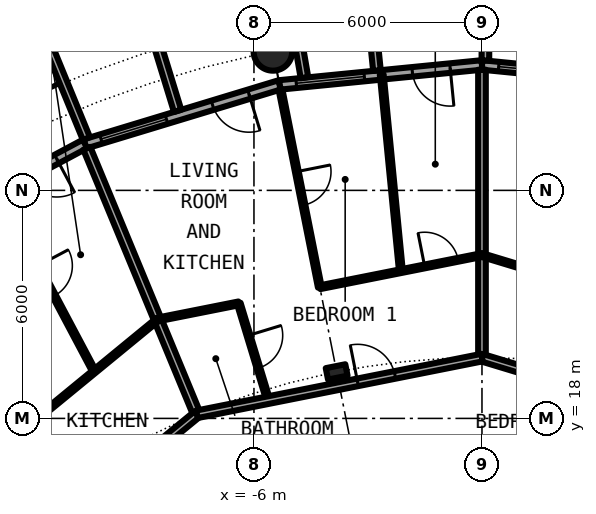
"""IFC4 building model, lengths in metres.
Left out: names, types, materials, properties, quantities, classifications, styles, units other than length and angle.
Written with IfcOpenShell. Run it as: python <this file> out.ifc"""

import sys

from ifc_helpers import new_model, si_unit, direction, frame, frame_2d, origin, origin_2d, place, context, subcontext, project, spatial, rectangle, hollow_circle, i_section, extrude, element, fill, save


model = new_model("IFC4")
c1 = context("Model", 3, precision=1e-05, world=origin(), true_north=direction((0.0, 1.0)))
c2 = subcontext(c1, "Body", "Model", "MODEL_VIEW")
j1 = project(units=[si_unit("LENGTHUNIT", "METRE"), si_unit("PLANEANGLEUNIT", "RADIAN")], contexts=[c1])
p1 = place(None, origin())
s1 = spatial("IfcSite", under=j1, at=p1, CompositionType="ELEMENT")
p2 = place(p1, origin())
s2 = spatial("IfcBuilding", under=s1, at=p2, CompositionType="ELEMENT")
p3 = place(p2, frame((0.0, 0.0, 88.0)))
s3 = spatial("IfcBuildingStorey", under=s2, at=p3, CompositionType="ELEMENT", Elevation=88.0)
p4 = place(p3, frame((-5.501, 27.658, 0.0), z_axis=(0.0, 0.0, 1.0), x_axis=(1.0, 0.0, 0.0)))
e1 = element("IfcColumn", 1, at=p4, inside=s3, PredefinedType="COLUMN", context=c2, shape_type="SweptSolid", body=[
    extrude(hollow_circle(Radius=0.508, WallThickness=0.04, at=origin_2d()), origin(), (0.0, 0.0, 1.0), 3.05),
])
p5 = place(p3, frame((-3.824, 19.223, 0.0), z_axis=(0.0, 0.0, 1.0), x_axis=(-0.195090322016, 0.980785280403, 0.0)))
e2 = element("IfcColumn", 2, at=p5, inside=s3, PredefinedType="COLUMN", context=c2, shape_type="SweptSolid", body=[
    extrude(i_section(OverallWidth=0.306, OverallDepth=0.524, WebThickness=0.021, FlangeThickness=0.04, FilletRadius=0.027, at=origin_2d()), origin(), (0.0, 0.0, 1.0), 3.05),
])
p6 = place(p3, frame((5.326, 26.775, 0.0), z_axis=(0.0, 0.0, 1.0), x_axis=(-0.995173996315, 0.098126026407, 0.0)))
e3 = element("IfcWall", 3, at=p6, inside=s3, PredefinedType="SOLIDWALL", context=c2, shape_type="SweptSolid", body=[
    extrude(rectangle(XDim=5.352, YDim=0.25, at=frame_2d((2.676, 0.0))), origin(), (0.0, 0.0, 1.0), 2.7),
])
p7 = place(p6, frame((0.841, 0.0, 0.0)))
e4 = element("IfcOpeningElement", 4, at=p7, cuts=e3, PredefinedType="OPENING", context=c2, shape_type="SweptSolid", body=[
    extrude(rectangle(XDim=1.0, YDim=2.2, at=frame_2d((0.5, 1.1))), frame((0.0, 0.135, 0.0), z_axis=(0.0, -1.0, 0.0), x_axis=(1.0, 0.0, 0.0)), (0.0, 0.0, 1.0), 0.27),
])
p8 = place(p6, frame((3.111, 0.0, 0.3)))
e5 = element("IfcOpeningElement", 5, at=p8, cuts=e3, PredefinedType="OPENING", context=c2, shape_type="SweptSolid", body=[
    extrude(rectangle(XDim=1.8, YDim=2.1, at=frame_2d((0.9, 1.05))), frame((0.0, 0.135, 0.0), z_axis=(0.0, -1.0, 0.0), x_axis=(1.0, 0.0, 0.0)), (0.0, 0.0, 1.0), 0.27),
])
p9 = place(p3, frame((0.09, 27.417, -0.03), z_axis=(0.0, 0.0, 1.0), x_axis=(0.00347308367, 0.999993968827, 0.0)))
e6 = element("IfcWall", 6, at=p9, inside=s3, PredefinedType="SOLIDWALL", context=c2, shape_type="SweptSolid", body=[
    extrude(rectangle(XDim=2.882, YDim=0.2, at=frame_2d((1.441, 0.0))), origin(), (0.0, 0.0, 1.0), 2.73),
])
p10 = place(p3, frame((0.0, 27.3, 0.0), z_axis=(0.0, 0.0, 1.0), x_axis=(-0.995173996315, -0.098126026407, 0.0)))
e7 = element("IfcWall", 7, at=p10, inside=s3, PredefinedType="SOLIDWALL", context=c2, shape_type="SweptSolid", body=[
    extrude(rectangle(XDim=5.352, YDim=0.25, at=frame_2d((2.676, 0.0))), origin(), (0.0, 0.0, 1.0), 2.7),
])
p11 = place(p10, frame((0.841, 0.0, 0.0)))
e8 = element("IfcOpeningElement", 8, at=p11, cuts=e7, PredefinedType="OPENING", context=c2, shape_type="SweptSolid", body=[
    extrude(rectangle(XDim=1.0, YDim=2.2, at=frame_2d((0.5, 1.1))), frame((0.0, 0.135, 0.0), z_axis=(0.0, -1.0, 0.0), x_axis=(1.0, 0.0, 0.0)), (0.0, 0.0, 1.0), 0.27),
])
p12 = place(p10, frame((3.111, 0.0, 0.3)))
e9 = element("IfcOpeningElement", 9, at=p12, cuts=e7, PredefinedType="OPENING", context=c2, shape_type="SweptSolid", body=[
    extrude(rectangle(XDim=1.8, YDim=2.1, at=frame_2d((0.9, 1.05))), frame((0.0, 0.135, 0.0), z_axis=(0.0, -1.0, 0.0), x_axis=(1.0, 0.0, 0.0)), (0.0, 0.0, 1.0), 0.27),
])
p13 = place(p3, frame((-2.764, 27.153, -0.03), z_axis=(0.0, 0.0, 1.0), x_axis=(-0.101505487237, 0.994834979311, 0.0)))
e10 = element("IfcWall", 10, at=p13, inside=s3, PredefinedType="SOLIDWALL", context=c2, shape_type="SweptSolid", body=[
    extrude(rectangle(XDim=3.007, YDim=0.2, at=frame_2d((1.503, 0.0))), origin(), (0.0, 0.0, 1.0), 2.73),
])
p14 = place(p3, frame((-4.671, 26.966, -0.03), z_axis=(0.0, 0.0, 1.0), x_axis=(-0.170539878907, 0.985350774954, 0.0)))
e11 = element("IfcWall", 11, at=p14, inside=s3, PredefinedType="SOLIDWALL", context=c2, shape_type="SweptSolid", body=[
    extrude(rectangle(XDim=2.932, YDim=0.2, at=frame_2d((1.466, 0.0))), origin(), (0.0, 0.0, 1.0), 2.73),
])
p15 = place(p3, frame((-5.326, 26.775, 0.0), z_axis=(0.0, 0.0, 1.0), x_axis=(-0.956965678721, -0.290201119486, 0.0)))
e12 = element("IfcWall", 12, at=p15, inside=s3, PredefinedType="SOLIDWALL", context=c2, shape_type="SweptSolid", body=[
    extrude(rectangle(XDim=5.351, YDim=0.25, at=frame_2d((2.676, 0.0))), origin(), (0.0, 0.0, 1.0), 2.7),
])
p16 = place(p15, frame((0.841, 0.0, 0.0)))
e13 = element("IfcOpeningElement", 13, at=p16, cuts=e12, PredefinedType="OPENING", context=c2, shape_type="SweptSolid", body=[
    extrude(rectangle(XDim=1.0, YDim=2.2, at=frame_2d((0.5, 1.1))), frame((0.0, 0.135, 0.0), z_axis=(0.0, -1.0, 0.0), x_axis=(1.0, 0.0, 0.0)), (0.0, 0.0, 1.0), 0.27),
])
p17 = place(p15, frame((3.111, 0.0, 0.3)))
e14 = element("IfcOpeningElement", 14, at=p17, cuts=e12, PredefinedType="OPENING", context=c2, shape_type="SweptSolid", body=[
    extrude(rectangle(XDim=1.8, YDim=2.1, at=frame_2d((0.9, 1.05))), frame((0.0, 0.135, 0.0), z_axis=(0.0, -1.0, 0.0), x_axis=(1.0, 0.0, 0.0)), (0.0, 0.0, 1.0), 0.27),
])
p18 = place(p3, frame((-8.009, 26.092, -0.03), z_axis=(0.0, 0.0, 1.0), x_axis=(-0.293406695073, 0.955987715029, 0.0)))
e15 = element("IfcWall", 15, at=p18, inside=s3, PredefinedType="SOLIDWALL", context=c2, shape_type="SweptSolid", body=[
    extrude(rectangle(XDim=3.006, YDim=0.2, at=frame_2d((1.503, 0.0))), origin(), (0.0, 0.0, 1.0), 2.73),
])
p19 = place(p3, frame((-10.409, 25.364, -0.03), z_axis=(0.0, 0.0, 1.0), x_axis=(-0.379509886562, 0.925187681501, 0.0)))
e16 = element("IfcWall", 16, at=p19, inside=s3, PredefinedType="SOLIDWALL", context=c2, shape_type="SweptSolid", body=[
    extrude(rectangle(XDim=2.883, YDim=0.2, at=frame_2d((1.441, 0.0))), origin(), (0.0, 0.0, 1.0), 2.73),
])
p20 = place(p3, frame((-10.447, 25.222, 0.0), z_axis=(0.0, 0.0, 1.0), x_axis=(-0.881915646801, -0.471407246368, 0.0)))
e17 = element("IfcWall", 17, at=p20, inside=s3, PredefinedType="SOLIDWALL", context=c2, shape_type="SweptSolid", body=[
    extrude(rectangle(XDim=5.352, YDim=0.25, at=frame_2d((2.676, 0.0))), origin(), (0.0, 0.0, 1.0), 2.7),
])
p21 = place(p20, frame((0.841, 0.0, 0.0)))
e18 = element("IfcOpeningElement", 18, at=p21, cuts=e17, PredefinedType="OPENING", context=c2, shape_type="SweptSolid", body=[
    extrude(rectangle(XDim=1.0, YDim=2.2, at=frame_2d((0.5, 1.1))), frame((0.0, 0.135, 0.0), z_axis=(0.0, -1.0, 0.0), x_axis=(1.0, 0.0, 0.0)), (0.0, 0.0, 1.0), 0.27),
])
p22 = place(p20, frame((3.111, 0.0, 0.3)))
e19 = element("IfcOpeningElement", 19, at=p22, cuts=e17, PredefinedType="OPENING", context=c2, shape_type="SweptSolid", body=[
    extrude(rectangle(XDim=1.8, YDim=2.1, at=frame_2d((0.9, 1.05))), frame((0.0, 0.135, 0.0), z_axis=(0.0, -1.0, 0.0), x_axis=(1.0, 0.0, 0.0)), (0.0, 0.0, 1.0), 0.27),
])
p23 = place(p3, frame((-12.734, 24.007, 0.0), z_axis=(0.0, 0.0, 1.0), x_axis=(0.468610030042, -0.883405139075, 0.0)))
e20 = element("IfcWall", 20, at=p23, inside=s3, PredefinedType="PARTITIONING", context=c2, shape_type="SweptSolid", body=[
    extrude(rectangle(XDim=5.403, YDim=0.1, at=frame_2d((2.702, 0.0))), origin(), (0.0, 0.0, 1.0), 2.7),
])
p24 = place(p23, frame((2.252, 0.0, 0.0)))
e21 = element("IfcOpeningElement", 21, at=p24, cuts=e20, PredefinedType="OPENING", context=c2, shape_type="SweptSolid", body=[
    extrude(rectangle(XDim=0.9, YDim=2.3, at=frame_2d((0.45, 1.15))), frame((0.0, 0.06, 0.0), z_axis=(0.0, -1.0, 0.0), x_axis=(1.0, 0.0, 0.0)), (0.0, 0.0, 1.0), 0.12),
])
p25 = place(p3, frame((-10.398, 25.106, 0.0), z_axis=(0.0, 0.0, 1.0), x_axis=(0.382490346157, -0.923959487801, 0.0)))
e22 = element("IfcWall", 22, at=p25, inside=s3, PredefinedType="PARTITIONING", context=c2, shape_type="SweptSolid", body=[
    extrude(rectangle(XDim=7.574, YDim=0.2, at=frame_2d((3.787, 0.0))), origin(), (0.0, 0.0, 1.0), 2.7),
])
p26 = place(p3, frame((-6.4, 21.027, 0.0), z_axis=(0.0, 0.0, 1.0), x_axis=(0.291157965538, -0.956674991365, 0.0)))
e23 = element("IfcWall", 23, at=p26, inside=s3, PredefinedType="PARTITIONING", context=c2, shape_type="SweptSolid", body=[
    extrude(rectangle(XDim=2.661, YDim=0.1, at=frame_2d((1.331, 0.0))), origin(), (0.0, 0.0, 1.0), 2.7),
])
p27 = place(p26, frame((0.881, 0.0, 0.0)))
e24 = element("IfcOpeningElement", 24, at=p27, cuts=e23, PredefinedType="OPENING", context=c2, shape_type="SweptSolid", body=[
    extrude(rectangle(XDim=0.9, YDim=2.3, at=frame_2d((0.45, 1.15))), frame((0.0, 0.06, 0.0), z_axis=(0.0, -1.0, 0.0), x_axis=(1.0, 0.0, 0.0)), (0.0, 0.0, 1.0), 0.12),
])
p28 = place(p3, frame((-5.302, 26.653, 0.0), z_axis=(0.0, 0.0, 1.0), x_axis=(0.195115793364, -0.980780213493, 0.0)))
e25 = element("IfcWall", 25, at=p28, inside=s3, PredefinedType="PARTITIONING", context=c2, shape_type="SweptSolid", body=[
    extrude(rectangle(XDim=5.304, YDim=0.1, at=frame_2d((2.652, 0.0))), origin(), (0.0, 0.0, 1.0), 2.7),
])
p29 = place(p28, frame((2.202, 0.0, 0.0)))
e26 = element("IfcOpeningElement", 26, at=p29, cuts=e25, PredefinedType="OPENING", context=c2, shape_type="SweptSolid", body=[
    extrude(rectangle(XDim=0.9, YDim=2.3, at=frame_2d((0.45, 1.15))), frame((0.0, 0.06, 0.0), z_axis=(0.0, -1.0, 0.0), x_axis=(1.0, 0.0, 0.0)), (0.0, 0.0, 1.0), 0.12),
])
p30 = place(p3, frame((-2.638, 27.047, 0.0), z_axis=(0.0, 0.0, 1.0), x_axis=(0.097172620677, -0.99526754282, 0.0)))
e27 = element("IfcWall", 27, at=p30, inside=s3, PredefinedType="PARTITIONING", context=c2, shape_type="SweptSolid", body=[
    extrude(rectangle(XDim=5.196, YDim=0.1, at=frame_2d((2.598, 0.0))), origin(), (0.0, 0.0, 1.0), 2.7),
])
p31 = place(p3, frame((0.0, 19.6, 0.0), z_axis=(0.0, 0.0, 1.0), x_axis=(0.0, 1.0, 0.0)))
e28 = element("IfcWall", 28, at=p31, inside=s3, PredefinedType="PARTITIONING", context=c2, shape_type="SweptSolid", body=[
    extrude(rectangle(XDim=7.575, YDim=0.2, at=frame_2d((3.788, 0.0))), origin(), (0.0, 0.0, 1.0), 2.7),
])
p32 = place(p3, frame((-0.007, 19.599, 0.0), z_axis=(0.0, 0.0, 1.0), x_axis=(0.95700958731, -0.290056287291, 0.0)))
e29 = element("IfcWall", 29, at=p32, inside=s3, PredefinedType="PARTITIONING", context=c2, shape_type="SweptSolid", body=[
    extrude(rectangle(XDim=11.226, YDim=0.2, at=frame_2d((5.613, 0.0))), origin(), (0.0, 0.0, 1.0), 2.38),
])
p33 = place(p32, frame((7.093, 0.0, 0.0)))
e30 = element("IfcOpeningElement", 30, at=p33, cuts=e29, PredefinedType="OPENING", context=c2, shape_type="SweptSolid", body=[
    extrude(rectangle(XDim=1.0, YDim=2.3, at=frame_2d((0.5, 1.15))), frame((0.0, 0.11, 0.0), z_axis=(0.0, -1.0, 0.0), x_axis=(1.0, 0.0, 0.0)), (0.0, 0.0, 1.0), 0.22),
])
p34 = place(p3, frame((-16.173, 10.991, 0.0), z_axis=(0.0, 0.0, 1.0), x_axis=(0.773049018445, 0.634346289562, 0.0)))
e31 = element("IfcWall", 31, at=p34, inside=s3, PredefinedType="PARTITIONING", context=c2, shape_type="SweptSolid", body=[
    extrude(rectangle(XDim=11.219, YDim=0.2, at=frame_2d((5.61, 0.0))), origin(), (0.0, 0.0, 1.0), 2.38),
])
p35 = place(p34, frame((3.135, 0.0, 0.0)))
e32 = element("IfcOpeningElement", 32, at=p35, cuts=e31, PredefinedType="OPENING", context=c2, shape_type="SweptSolid", body=[
    extrude(rectangle(XDim=1.0, YDim=2.3, at=frame_2d((0.5, 1.15))), frame((0.0, 0.11, 0.0), z_axis=(0.0, -1.0, 0.0), x_axis=(1.0, 0.0, 0.0)), (0.0, 0.0, 1.0), 0.22),
])
p36 = place(p3, frame((-7.501, 18.108, 0.0), z_axis=(0.0, 0.0, 1.0), x_axis=(0.980791233058, 0.195060393611, 0.0)))
e33 = element("IfcWall", 33, at=p36, inside=s3, PredefinedType="PARTITIONING", context=c2, shape_type="SweptSolid", body=[
    extrude(rectangle(XDim=7.65, YDim=0.2, at=frame_2d((3.825, 0.0))), origin(), (0.0, 0.0, 1.0), 2.38),
])
p37 = place(p36, frame((4.313, 0.0, 0.0)))
e34 = element("IfcOpeningElement", 34, at=p37, cuts=e33, PredefinedType="OPENING", context=c2, shape_type="SweptSolid", body=[
    extrude(rectangle(XDim=1.0, YDim=2.3, at=frame_2d((0.5, 1.15))), frame((0.0, 0.11, 0.0), z_axis=(0.0, -1.0, 0.0), x_axis=(1.0, 0.0, 0.0)), (0.0, 0.0, 1.0), 0.22),
])
p38 = place(p3, frame((-13.538, 16.496, 0.0), z_axis=(0.0, 0.0, 1.0), x_axis=(0.773000340237, 0.634405606843, 0.0)))
e35 = element("IfcWall", 35, at=p38, inside=s3, PredefinedType="PARTITIONING", context=c2, shape_type="SweptSolid", body=[
    extrude(rectangle(XDim=6.474, YDim=0.1, at=frame_2d((3.237, 0.0))), origin(), (0.0, 0.0, 1.0), 2.7),
])
p39 = place(p3, frame((-0.004, 22.299, 0.0), z_axis=(0.0, 0.0, 1.0), x_axis=(0.95699555343, -0.290102586537, 0.0)))
e36 = element("IfcWall", 36, at=p39, inside=s3, PredefinedType="PARTITIONING", context=c2, shape_type="SweptSolid", body=[
    extrude(rectangle(XDim=6.478, YDim=0.1, at=frame_2d((3.239, 0.0))), origin(), (0.0, 0.0, 1.0), 2.7),
])
p40 = place(p3, frame((-8.534, 20.603, 0.0), z_axis=(0.0, 0.0, 1.0), x_axis=(0.980821612706, 0.194907578226, 0.0)))
e37 = element("IfcWall", 37, at=p40, inside=s3, PredefinedType="PARTITIONING", context=c2, shape_type="SweptSolid", body=[
    extrude(rectangle(XDim=2.176, YDim=0.1, at=frame_2d((1.088, 0.0))), origin(), (0.0, 0.0, 1.0), 2.7),
])
p41 = place(p3, frame((-4.261, 21.452, 0.0), z_axis=(0.0, 0.0, 1.0), x_axis=(0.980819753929, 0.194916931799, 0.0)))
e38 = element("IfcWall", 38, at=p41, inside=s3, PredefinedType="PARTITIONING", context=c2, shape_type="SweptSolid", body=[
    extrude(rectangle(XDim=4.346, YDim=0.1, at=frame_2d((2.173, 0.0))), origin(), (0.0, 0.0, 1.0), 2.7),
])
p42 = place(p41, frame((2.807, 0.0, 0.0)))
e39 = element("IfcOpeningElement", 39, at=p42, cuts=e38, PredefinedType="OPENING", context=c2, shape_type="SweptSolid", body=[
    extrude(rectangle(XDim=0.9, YDim=2.3, at=frame_2d((0.45, 1.15))), frame((0.0, 0.06, 0.0), z_axis=(0.0, -1.0, 0.0), x_axis=(1.0, 0.0, 0.0)), (0.0, 0.0, 1.0), 0.12),
])
p43 = place(p8, origin())
e40 = element("IfcWindow", 40, at=p43, inside=s3, PartitioningType="SINGLE_PANEL", PredefinedType="WINDOW", context=c2, shape_type="SweptSolid", body=[
    extrude(rectangle(XDim=1.8, YDim=2.1, at=frame_2d((0.9, 1.05))), frame((0.0, 0.03, 0.0), z_axis=(0.0, -1.0, 0.0), x_axis=(1.0, 0.0, 0.0)), (0.0, 0.0, 1.0), 0.06),
])
fill(e5, e40)
p44 = place(p11, origin())
e41 = element("IfcDoor", 41, at=p44, inside=s3, OperationType="SINGLE_SWING_LEFT", PredefinedType="DOOR", context=c2, shape_type="SweptSolid", body=[
    extrude(rectangle(XDim=1.0, YDim=2.2, at=frame_2d((0.5, 1.1))), frame((0.0, 0.025, 0.0), z_axis=(0.0, -1.0, 0.0), x_axis=(1.0, 0.0, 0.0)), (0.0, 0.0, 1.0), 0.05),
])
fill(e8, e41)
p45 = place(p12, origin())
e42 = element("IfcWindow", 42, at=p45, inside=s3, PartitioningType="SINGLE_PANEL", PredefinedType="WINDOW", context=c2, shape_type="SweptSolid", body=[
    extrude(rectangle(XDim=1.8, YDim=2.1, at=frame_2d((0.9, 1.05))), frame((0.0, 0.03, 0.0), z_axis=(0.0, -1.0, 0.0), x_axis=(1.0, 0.0, 0.0)), (0.0, 0.0, 1.0), 0.06),
])
fill(e9, e42)
p46 = place(p16, origin())
e43 = element("IfcDoor", 43, at=p46, inside=s3, OperationType="SINGLE_SWING_LEFT", PredefinedType="DOOR", context=c2, shape_type="SweptSolid", body=[
    extrude(rectangle(XDim=1.0, YDim=2.2, at=frame_2d((0.5, 1.1))), frame((0.0, 0.025, 0.0), z_axis=(0.0, -1.0, 0.0), x_axis=(1.0, 0.0, 0.0)), (0.0, 0.0, 1.0), 0.05),
])
fill(e13, e43)
p47 = place(p17, origin())
e44 = element("IfcWindow", 44, at=p47, inside=s3, PartitioningType="SINGLE_PANEL", PredefinedType="WINDOW", context=c2, shape_type="SweptSolid", body=[
    extrude(rectangle(XDim=1.8, YDim=2.1, at=frame_2d((0.9, 1.05))), frame((0.0, 0.03, 0.0), z_axis=(0.0, -1.0, 0.0), x_axis=(1.0, 0.0, 0.0)), (0.0, 0.0, 1.0), 0.06),
])
fill(e14, e44)
p48 = place(p21, origin())
e45 = element("IfcDoor", 45, at=p48, inside=s3, OperationType="SINGLE_SWING_LEFT", PredefinedType="DOOR", context=c2, shape_type="SweptSolid", body=[
    extrude(rectangle(XDim=1.0, YDim=2.2, at=frame_2d((0.5, 1.1))), frame((0.0, 0.025, 0.0), z_axis=(0.0, -1.0, 0.0), x_axis=(1.0, 0.0, 0.0)), (0.0, 0.0, 1.0), 0.05),
])
fill(e18, e45)
p49 = place(p37, origin())
e46 = element("IfcDoor", 46, at=p49, inside=s3, OperationType="SINGLE_SWING_RIGHT", PredefinedType="DOOR", context=c2, shape_type="SweptSolid", body=[
    extrude(rectangle(XDim=1.0, YDim=2.3, at=frame_2d((0.5, 1.15))), frame((0.0, 0.025, 0.0), z_axis=(0.0, -1.0, 0.0), x_axis=(1.0, 0.0, 0.0)), (0.0, 0.0, 1.0), 0.05),
])
fill(e34, e46)
p50 = place(p27, origin())
e47 = element("IfcDoor", 47, at=p50, inside=s3, OperationType="SINGLE_SWING_RIGHT", PredefinedType="DOOR", context=c2, shape_type="SweptSolid", body=[
    extrude(rectangle(XDim=0.9, YDim=2.3, at=frame_2d((0.45, 1.15))), frame((0.0, 0.025, 0.0), z_axis=(0.0, -1.0, 0.0), x_axis=(1.0, 0.0, 0.0)), (0.0, 0.0, 1.0), 0.05),
])
fill(e24, e47)
p51 = place(p29, origin())
e48 = element("IfcDoor", 48, at=p51, inside=s3, OperationType="SINGLE_SWING_LEFT", PredefinedType="DOOR", context=c2, shape_type="SweptSolid", body=[
    extrude(rectangle(XDim=0.9, YDim=2.3, at=frame_2d((0.45, 1.15))), frame((0.0, 0.025, 0.0), z_axis=(0.0, -1.0, 0.0), x_axis=(1.0, 0.0, 0.0)), (0.0, 0.0, 1.0), 0.05),
])
fill(e26, e48)
p52 = place(p42, origin())
e49 = element("IfcDoor", 49, at=p52, inside=s3, OperationType="SINGLE_SWING_RIGHT", PredefinedType="DOOR", context=c2, shape_type="SweptSolid", body=[
    extrude(rectangle(XDim=0.9, YDim=2.3, at=frame_2d((0.45, 1.15))), frame((0.0, 0.025, 0.0), z_axis=(0.0, -1.0, 0.0), x_axis=(1.0, 0.0, 0.0)), (0.0, 0.0, 1.0), 0.05),
])
fill(e39, e49)
p53 = place(p24, origin())
e50 = element("IfcDoor", 50, at=p53, inside=s3, OperationType="SINGLE_SWING_LEFT", PredefinedType="DOOR", context=c2, shape_type="SweptSolid", body=[
    extrude(rectangle(XDim=0.9, YDim=2.3, at=frame_2d((0.45, 1.15))), frame((0.0, 0.025, 0.0), z_axis=(0.0, -1.0, 0.0), x_axis=(1.0, 0.0, 0.0)), (0.0, 0.0, 1.0), 0.05),
])
fill(e21, e50)
save(model, sys.argv[1])
